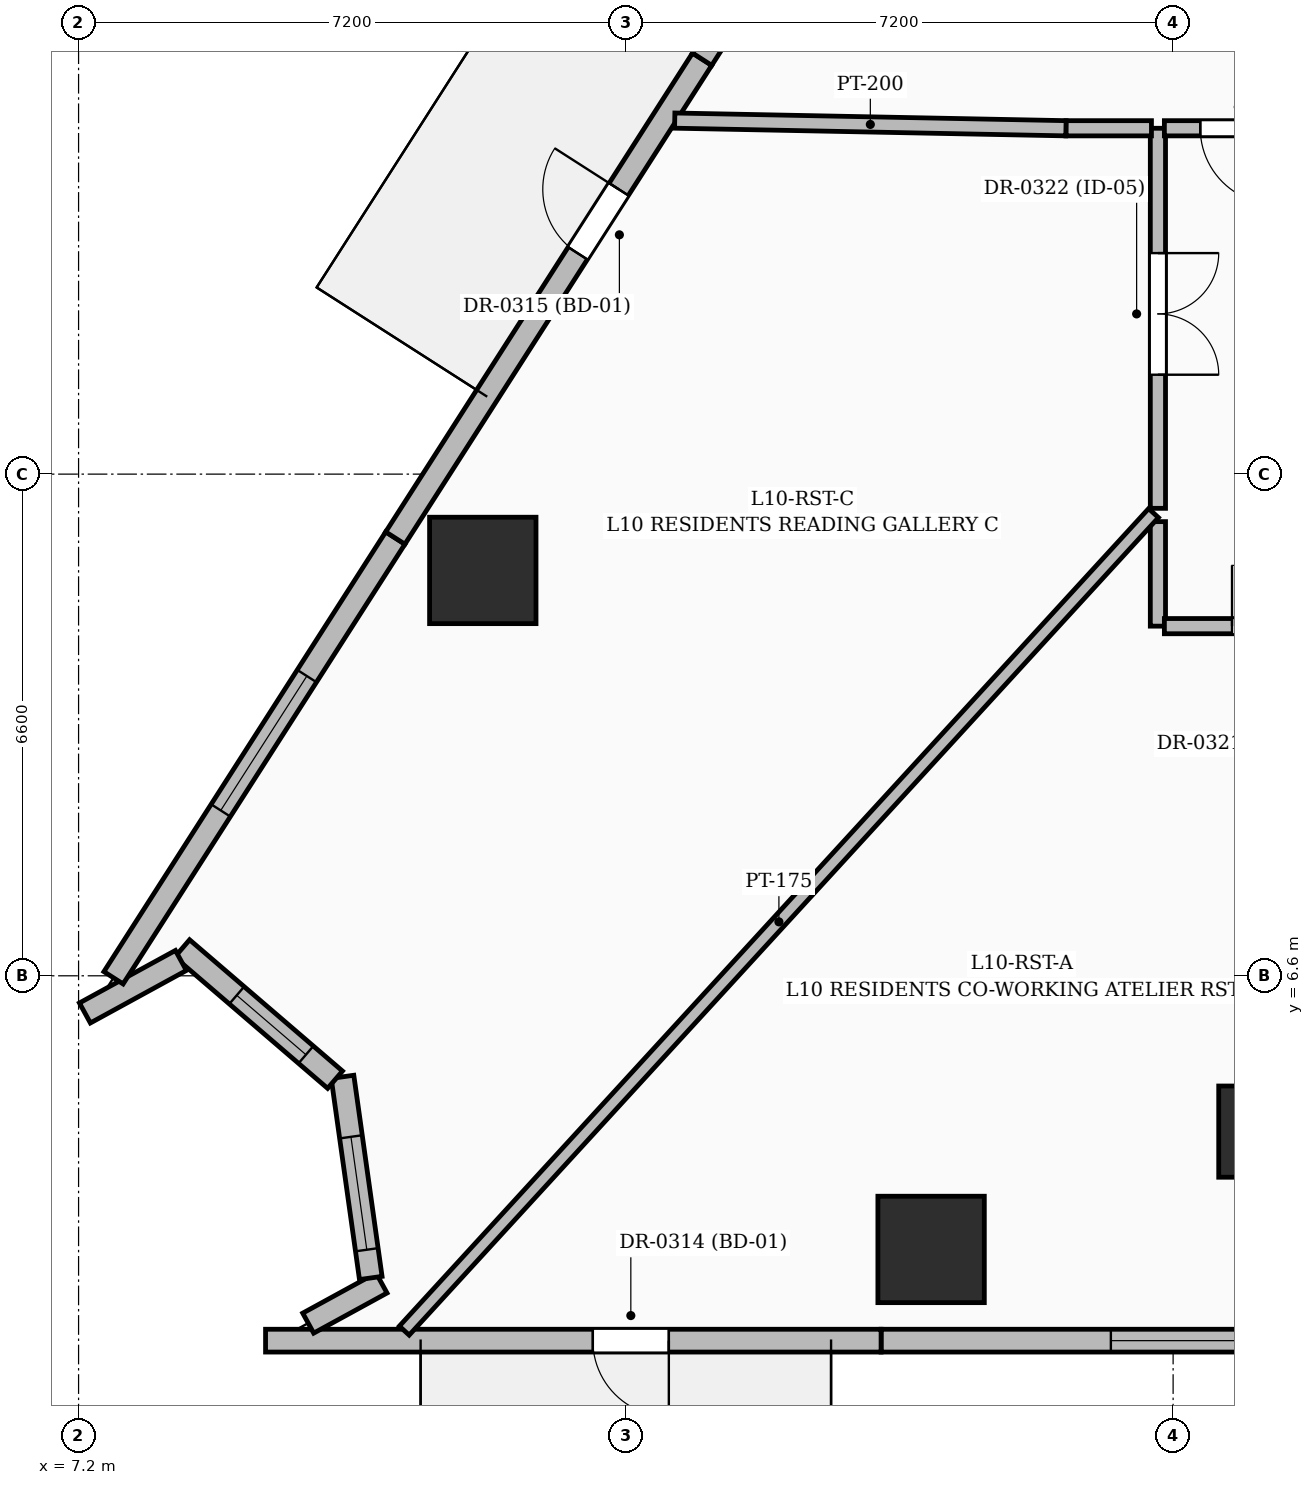
"""IFC4 building model, lengths in metres.
Left out: names, types, materials, properties, quantities, classifications, styles, units other than length and angle.
Written with IfcOpenShell. Run it as: python <this file> out.ifc"""

import sys

from ifc_helpers import new_model, si_unit, direction, frame, frame_2d, origin, origin_2d, place, context, subcontext, project, spatial, rectangle, extrude, element, fill, save


model = new_model("IFC4")
c1 = context("Model", 3, precision=1e-05, world=origin(), true_north=direction((0.0, 1.0)))
c2 = subcontext(c1, "Body", "Model", "MODEL_VIEW")
j1 = project(units=[si_unit("LENGTHUNIT", "METRE"), si_unit("PLANEANGLEUNIT", "RADIAN")], contexts=[c1])
p1 = place(None, origin())
s1 = spatial("IfcSite", under=j1, at=p1, CompositionType="ELEMENT")
p2 = place(p1, origin())
s2 = spatial("IfcBuilding", under=s1, at=p2, CompositionType="ELEMENT")
p3 = place(p2, frame((0.0, 0.0, 46.2)))
s3 = spatial("IfcBuildingStorey", under=s2, at=p3, CompositionType="ELEMENT", Elevation=46.2)
p4 = place(p3, frame((22.8, 4.55, 0.0), z_axis=(0.0, 0.0, 1.0), x_axis=(1.0, 0.0, 0.0)))
e1 = element("IfcColumn", 1, at=p4, inside=s3, PredefinedType="COLUMN", context=c2, shape_type="SweptSolid", body=[
    extrude(rectangle(XDim=1.2, YDim=1.2, at=origin_2d()), origin(), (0.0, 0.0, 1.0), 3.6),
])
for number, where, z_axis, x_axis in (
    (2, (18.416, 3.0, 0.0), (0.0, 0.0, 1.0), (1.0, 0.0, 0.0)),
    (3, (12.518, 11.933, 0.0), (0.0, 0.0, 1.0), (1.0, 0.0, 0.0)),
):
    element("IfcColumn", number, at=place(p3, frame(where, z_axis=z_axis, x_axis=x_axis)), inside=s3, PredefinedType="COLUMN", context=c2, shape_type="SweptSolid", body=[
        extrude(rectangle(XDim=1.4, YDim=1.4, at=origin_2d()), origin(), (0.0, 0.0, 1.0), 3.6),
    ])
p5 = place(p3, frame((25.581, 1.8, 0.0), z_axis=(0.0, 0.0, 1.0), x_axis=(-1.0, 0.0, 0.0)))
e4 = element("IfcWall", 4, at=p5, inside=s3, PredefinedType="SOLIDWALL", context=c2, shape_type="SweptSolid", body=[
    extrude(rectangle(XDim=7.823, YDim=0.3, at=frame_2d((3.912, 0.0))), origin(), (0.0, 0.0, 1.0), 3.35),
])
p6 = place(p5, frame((2.7, 0.0, 0.55)))
e5 = element("IfcOpeningElement", 5, at=p6, cuts=e4, PredefinedType="OPENING", context=c2, shape_type="SweptSolid", body=[
    extrude(rectangle(XDim=2.1, YDim=2.4, at=frame_2d((1.05, 1.2))), frame((0.0, 0.16, 0.0), z_axis=(0.0, -1.0, 0.0), x_axis=(1.0, 0.0, 0.0)), (0.0, 0.0, 1.0), 0.32),
])
p7 = place(p3, frame((17.758, 1.8, 0.0), z_axis=(0.0, 0.0, 1.0), x_axis=(-1.0, 0.0, 0.0)))
e6 = element("IfcWall", 6, at=p7, inside=s3, PredefinedType="SOLIDWALL", context=c2, shape_type="SweptSolid", body=[
    extrude(rectangle(XDim=8.098, YDim=0.3, at=frame_2d((4.049, 0.0))), origin(), (0.0, 0.0, 1.0), 3.35),
])
p8 = place(p7, frame((2.792, 0.0, 0.0)))
e7 = element("IfcOpeningElement", 7, at=p8, cuts=e6, PredefinedType="OPENING", context=c2, shape_type="SweptSolid", body=[
    extrude(rectangle(XDim=1.0, YDim=2.2, at=frame_2d((0.5, 1.1))), frame((0.0, 0.16, 0.0), z_axis=(0.0, -1.0, 0.0), x_axis=(1.0, 0.0, 0.0)), (0.0, 0.0, 1.0), 0.32),
])
p9 = place(p3, frame((10.221, 2.031, 0.0), z_axis=(0.0, 0.0, 1.0), x_axis=(0.877343386297, 0.479863087266, 0.0)))
e8 = element("IfcWall", 8, at=p9, inside=s3, PredefinedType="SOLIDWALL", context=c2, shape_type="SweptSolid", body=[
    extrude(rectangle(XDim=1.099, YDim=0.3, at=frame_2d((0.55, 0.0))), origin(), (0.0, 0.0, 1.0), 3.35),
])
p10 = place(p3, frame((11.044, 2.625, 0.0), z_axis=(0.0, 0.0, 1.0), x_axis=(-0.139079814349, 0.990281174839, 0.0)))
e9 = element("IfcWall", 9, at=p10, inside=s3, PredefinedType="SOLIDWALL", context=c2, shape_type="SweptSolid", body=[
    extrude(rectangle(XDim=2.672, YDim=0.3, at=frame_2d((1.336, 0.0))), origin(), (0.0, 0.0, 1.0), 3.35),
])
p11 = place(p10, frame((0.375, 0.0, 0.6)))
e10 = element("IfcOpeningElement", 10, at=p11, cuts=e9, PredefinedType="OPENING", context=c2, shape_type="SweptSolid", body=[
    extrude(rectangle(XDim=1.5, YDim=2.1, at=frame_2d((0.75, 1.05))), frame((0.0, 0.16, 0.0), z_axis=(0.0, -1.0, 0.0), x_axis=(1.0, 0.0, 0.0)), (0.0, 0.0, 1.0), 0.32),
])
p12 = place(p3, frame((10.574, 5.233, 0.0), z_axis=(0.0, 0.0, 1.0), x_axis=(-0.758703874518, 0.651435668958, 0.0)))
e11 = element("IfcWall", 11, at=p12, inside=s3, PredefinedType="SOLIDWALL", context=c2, shape_type="SweptSolid", body=[
    extrude(rectangle(XDim=2.652, YDim=0.3, at=frame_2d((1.326, 0.0))), origin(), (0.0, 0.0, 1.0), 3.35),
])
p13 = place(p12, frame((0.505, 0.0, 0.8)))
e12 = element("IfcOpeningElement", 12, at=p13, cuts=e11, PredefinedType="OPENING", context=c2, shape_type="SweptSolid", body=[
    extrude(rectangle(XDim=1.2, YDim=1.8, at=frame_2d((0.6, 0.9))), frame((0.0, 0.16, 0.0), z_axis=(0.0, -1.0, 0.0), x_axis=(1.0, 0.0, 0.0)), (0.0, 0.0, 1.0), 0.32),
])
p14 = place(p3, frame((8.546, 6.802, 0.0), z_axis=(0.0, 0.0, 1.0), x_axis=(-0.877298620335, -0.479944924714, 0.0)))
e13 = element("IfcWall", 13, at=p14, inside=s3, PredefinedType="SOLIDWALL", context=c2, shape_type="SweptSolid", body=[
    extrude(rectangle(XDim=1.44, YDim=0.3, at=frame_2d((0.72, 0.0))), origin(), (0.0, 0.0, 1.0), 3.35),
])
p15 = place(p3, frame((7.66, 6.574, 0.0), z_axis=(0.0, 0.0, 1.0), x_axis=(0.539514369137, 0.84197639248, 0.0)))
e14 = element("IfcWall", 14, at=p15, inside=s3, PredefinedType="SOLIDWALL", context=c2, shape_type="SweptSolid", body=[
    extrude(rectangle(XDim=6.872, YDim=0.3, at=frame_2d((3.436, 0.0))), origin(), (0.0, 0.0, 1.0), 3.35),
])
p16 = place(p15, frame((2.615, 0.0, 0.55)))
e15 = element("IfcOpeningElement", 15, at=p16, cuts=e14, PredefinedType="OPENING", context=c2, shape_type="SweptSolid", body=[
    extrude(rectangle(XDim=2.1, YDim=2.4, at=frame_2d((1.05, 1.2))), frame((0.0, 0.16, 0.0), z_axis=(0.0, -1.0, 0.0), x_axis=(1.0, 0.0, 0.0)), (0.0, 0.0, 1.0), 0.32),
])
p17 = place(p3, frame((11.367, 12.359, 0.0), z_axis=(0.0, 0.0, 1.0), x_axis=(0.539548093607, 0.841954781853, 0.0)))
e16 = element("IfcWall", 16, at=p17, inside=s3, PredefinedType="SOLIDWALL", context=c2, shape_type="SweptSolid", body=[
    extrude(rectangle(XDim=7.481, YDim=0.3, at=frame_2d((3.741, 0.0))), origin(), (0.0, 0.0, 1.0), 3.35),
])
p18 = place(p17, frame((4.449, 0.0, 0.0)))
e17 = element("IfcOpeningElement", 17, at=p18, cuts=e16, PredefinedType="OPENING", context=c2, shape_type="SweptSolid", body=[
    extrude(rectangle(XDim=1.0, YDim=2.2, at=frame_2d((0.5, 1.1))), frame((0.0, 0.16, 0.0), z_axis=(0.0, -1.0, 0.0), x_axis=(1.0, 0.0, 0.0)), (0.0, 0.0, 1.0), 0.32),
])
p19 = place(p3, frame((15.404, 18.658, 0.0), z_axis=(0.0, 0.0, 1.0), x_axis=(0.539510136354, 0.841979104712, 0.0)))
e18 = element("IfcWall", 18, at=p19, inside=s3, PredefinedType="SOLIDWALL", context=c2, shape_type="SweptSolid", body=[
    extrude(rectangle(XDim=7.481, YDim=0.3, at=frame_2d((3.741, 0.0))), origin(), (0.0, 0.0, 1.0), 3.35),
])
p20 = place(p19, frame((3.725, 0.0, 0.55)))
e19 = element("IfcOpeningElement", 19, at=p20, cuts=e18, PredefinedType="OPENING", context=c2, shape_type="SweptSolid", body=[
    extrude(rectangle(XDim=1.6, YDim=2.2, at=frame_2d((0.8, 1.1))), frame((0.0, 0.16, 0.0), z_axis=(0.0, -1.0, 0.0), x_axis=(1.0, 0.0, 0.0)), (0.0, 0.0, 1.0), 0.32),
])
p21 = place(p3, frame((21.4, 12.575, 0.0), z_axis=(0.0, 0.0, 1.0), x_axis=(0.0, -1.0, 0.0)))
e20 = element("IfcWall", 20, at=p21, inside=s3, PredefinedType="PARTITIONING", context=c2, shape_type="SweptSolid", body=[
    extrude(rectangle(XDim=1.375, YDim=0.2, at=frame_2d((0.688, 0.0))), origin(), (0.0, 0.0, 1.0), 3.35),
])
p22 = place(p3, frame((21.485, 11.2, 0.0), z_axis=(0.0, 0.0, 1.0), x_axis=(1.0, 0.0, 0.0)))
e21 = element("IfcWall", 21, at=p22, inside=s3, PredefinedType="PARTITIONING", context=c2, shape_type="SweptSolid", body=[
    extrude(rectangle(XDim=3.384, YDim=0.2, at=frame_2d((1.692, 0.0))), origin(), (0.0, 0.0, 1.0), 2.86),
])
p23 = place(p22, frame((0.89, 0.0, 0.0)))
e22 = element("IfcOpeningElement", 22, at=p23, cuts=e21, PredefinedType="OPENING", context=c2, shape_type="SweptSolid", body=[
    extrude(rectangle(XDim=1.6, YDim=2.3, at=frame_2d((0.8, 1.15))), frame((0.0, 0.11, 0.0), z_axis=(0.0, -1.0, 0.0), x_axis=(1.0, 0.0, 0.0)), (0.0, 0.0, 1.0), 0.22),
])
p24 = place(p3, frame((21.4, 17.75, 0.0), z_axis=(0.0, 0.0, 1.0), x_axis=(0.0, -1.0, 0.0)))
e23 = element("IfcWall", 23, at=p24, inside=s3, PredefinedType="PARTITIONING", context=c2, shape_type="SweptSolid", body=[
    extrude(rectangle(XDim=5.0, YDim=0.2, at=frame_2d((2.5, 0.0))), origin(), (0.0, 0.0, 1.0), 2.86),
])
p25 = place(p24, frame((1.642, 0.0, 0.0)))
e24 = element("IfcOpeningElement", 24, at=p25, cuts=e23, PredefinedType="OPENING", context=c2, shape_type="SweptSolid", body=[
    extrude(rectangle(XDim=1.6, YDim=2.3, at=frame_2d((0.8, 1.15))), frame((0.0, 0.11, 0.0), z_axis=(0.0, -1.0, 0.0), x_axis=(1.0, 0.0, 0.0)), (0.0, 0.0, 1.0), 0.22),
])
p26 = place(p3, frame((23.41, 17.75, 0.0), z_axis=(0.0, 0.0, 1.0), x_axis=(-1.0, 0.0, 0.0)))
e25 = element("IfcWall", 25, at=p26, inside=s3, PredefinedType="PARTITIONING", context=c2, shape_type="SweptSolid", body=[
    extrude(rectangle(XDim=1.925, YDim=0.2, at=frame_2d((0.962, 0.0))), origin(), (0.0, 0.0, 1.0), 2.279),
])
p27 = place(p26, frame((0.453, 0.0, 0.0)))
e26 = element("IfcOpeningElement", 26, at=p27, cuts=e25, PredefinedType="OPENING", context=c2, shape_type="SweptSolid", body=[
    extrude(rectangle(XDim=1.0, YDim=2.2, at=frame_2d((0.5, 1.1))), frame((0.0, 0.11, 0.0), z_axis=(0.0, -1.0, 0.0), x_axis=(1.0, 0.0, 0.0)), (0.0, 0.0, 1.0), 0.22),
])
p28 = place(p3, frame((21.342, 12.688, 0.0), z_axis=(0.0, 0.0, 1.0), x_axis=(-0.675645057992, -0.737227071947, 0.0)))
e27 = element("IfcWall", 27, at=p28, inside=s3, PredefinedType="PARTITIONING", context=c2, shape_type="SweptSolid", body=[
    extrude(rectangle(XDim=14.589, YDim=0.175, at=frame_2d((7.295, 0.0))), origin(), (0.0, 0.0, 1.0), 2.279),
])
p29 = place(p3, frame((21.315, 17.75, 0.0), z_axis=(0.0, 0.0, 1.0), x_axis=(-1.0, 0.0, 0.0)))
e28 = element("IfcWall", 28, at=p29, inside=s3, PredefinedType="PARTITIONING", context=c2, shape_type="SweptSolid", body=[
    extrude(rectangle(XDim=1.125, YDim=0.2, at=frame_2d((0.562, 0.0))), origin(), (0.0, 0.0, 1.0), 2.86),
])
p30 = place(p3, frame((20.19, 17.75, 0.0), z_axis=(0.0, 0.0, 1.0), x_axis=(-0.999807237974, 0.019633820156, 0.0)))
e29 = element("IfcWall", 29, at=p30, inside=s3, PredefinedType="PARTITIONING", context=c2, shape_type="SweptSolid", body=[
    extrude(rectangle(XDim=5.148, YDim=0.2, at=frame_2d((2.574, 0.0))), origin(), (0.0, 0.0, 1.0), 2.37),
])
p31 = place(p6, origin())
e30 = element("IfcWindow", 30, at=p31, inside=s3, PartitioningType="SINGLE_PANEL", PredefinedType="WINDOW", context=c2, shape_type="SweptSolid", body=[
    extrude(rectangle(XDim=2.1, YDim=2.4, at=frame_2d((1.05, 1.2))), frame((0.0, 0.03, 0.0), z_axis=(0.0, -1.0, 0.0), x_axis=(1.0, 0.0, 0.0)), (0.0, 0.0, 1.0), 0.06),
])
fill(e5, e30)
p32 = place(p8, origin())
e31 = element("IfcDoor", 31, at=p32, inside=s3, OperationType="SINGLE_SWING_LEFT", PredefinedType="DOOR", context=c2, shape_type="SweptSolid", body=[
    extrude(rectangle(XDim=1.0, YDim=2.2, at=frame_2d((0.5, 1.1))), frame((0.0, 0.025, 0.0), z_axis=(0.0, -1.0, 0.0), x_axis=(1.0, 0.0, 0.0)), (0.0, 0.0, 1.0), 0.05),
])
fill(e7, e31)
p33 = place(p11, origin())
e32 = element("IfcWindow", 32, at=p33, inside=s3, PartitioningType="SINGLE_PANEL", PredefinedType="WINDOW", context=c2, shape_type="SweptSolid", body=[
    extrude(rectangle(XDim=1.5, YDim=2.1, at=frame_2d((0.75, 1.05))), frame((0.0, 0.03, 0.0), z_axis=(0.0, -1.0, 0.0), x_axis=(1.0, 0.0, 0.0)), (0.0, 0.0, 1.0), 0.06),
])
fill(e10, e32)
p34 = place(p13, origin())
e33 = element("IfcWindow", 33, at=p34, inside=s3, PartitioningType="SINGLE_PANEL", PredefinedType="WINDOW", context=c2, shape_type="SweptSolid", body=[
    extrude(rectangle(XDim=1.2, YDim=1.8, at=frame_2d((0.6, 0.9))), frame((0.0, 0.03, 0.0), z_axis=(0.0, -1.0, 0.0), x_axis=(1.0, 0.0, 0.0)), (0.0, 0.0, 1.0), 0.06),
])
fill(e12, e33)
p35 = place(p16, origin())
e34 = element("IfcWindow", 34, at=p35, inside=s3, PartitioningType="SINGLE_PANEL", PredefinedType="WINDOW", context=c2, shape_type="SweptSolid", body=[
    extrude(rectangle(XDim=2.1, YDim=2.4, at=frame_2d((1.05, 1.2))), frame((0.0, 0.03, 0.0), z_axis=(0.0, -1.0, 0.0), x_axis=(1.0, 0.0, 0.0)), (0.0, 0.0, 1.0), 0.06),
])
fill(e15, e34)
p36 = place(p18, origin())
e35 = element("IfcDoor", 35, at=p36, inside=s3, OperationType="SINGLE_SWING_RIGHT", PredefinedType="DOOR", context=c2, shape_type="SweptSolid", body=[
    extrude(rectangle(XDim=1.0, YDim=2.2, at=frame_2d((0.5, 1.1))), frame((0.0, 0.025, 0.0), z_axis=(0.0, -1.0, 0.0), x_axis=(1.0, 0.0, 0.0)), (0.0, 0.0, 1.0), 0.05),
])
fill(e17, e35)
p37 = place(p23, origin())
e36 = element("IfcDoor", 36, at=p37, inside=s3, OperationType="DOUBLE_DOOR_SINGLE_SWING", PredefinedType="DOOR", context=c2, shape_type="SweptSolid", body=[
    extrude(rectangle(XDim=1.6, YDim=2.3, at=frame_2d((0.8, 1.15))), frame((0.0, 0.025, 0.0), z_axis=(0.0, -1.0, 0.0), x_axis=(1.0, 0.0, 0.0)), (0.0, 0.0, 1.0), 0.05),
])
fill(e22, e36)
p38 = place(p25, origin())
e37 = element("IfcDoor", 37, at=p38, inside=s3, OperationType="DOUBLE_DOOR_SINGLE_SWING", PredefinedType="DOOR", context=c2, shape_type="SweptSolid", body=[
    extrude(rectangle(XDim=1.6, YDim=2.3, at=frame_2d((0.8, 1.15))), frame((0.0, 0.025, 0.0), z_axis=(0.0, -1.0, 0.0), x_axis=(1.0, 0.0, 0.0)), (0.0, 0.0, 1.0), 0.05),
])
fill(e24, e37)
p39 = place(p27, origin())
e38 = element("IfcDoor", 38, at=p39, inside=s3, OperationType="SINGLE_SWING_LEFT", PredefinedType="DOOR", context=c2, shape_type="SweptSolid", body=[
    extrude(rectangle(XDim=1.0, YDim=2.2, at=frame_2d((0.5, 1.1))), frame((0.0, 0.025, 0.0), z_axis=(0.0, -1.0, 0.0), x_axis=(1.0, 0.0, 0.0)), (0.0, 0.0, 1.0), 0.05),
])
fill(e26, e38)
save(model, sys.argv[1])
